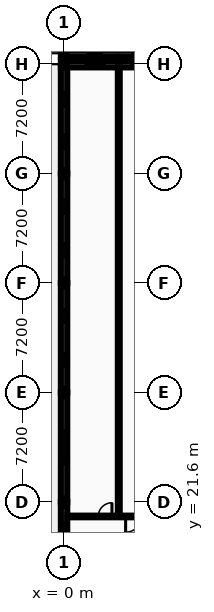
"""IFC4 building model, lengths in metres.
Left out: names, types, materials, properties, quantities, classifications, styles, units other than length and angle.
Written with IfcOpenShell. Run it as: python <this file> out.ifc"""

import sys

from ifc_helpers import new_model, si_unit, direction, frame, frame_2d, origin, origin_2d, place, context, subcontext, project, spatial, rectangle, i_section, extrude, element, fill, save


model = new_model("IFC4")
c1 = context("Model", 3, precision=1e-05, world=origin(), true_north=direction((0.0, 1.0)))
c2 = subcontext(c1, "Body", "Model", "MODEL_VIEW")
j1 = project(units=[si_unit("LENGTHUNIT", "METRE"), si_unit("PLANEANGLEUNIT", "RADIAN")], contexts=[c1])
p1 = place(None, origin())
s1 = spatial("IfcSite", under=j1, at=p1, CompositionType="ELEMENT")
p2 = place(p1, origin())
s2 = spatial("IfcBuilding", under=s1, at=p2, CompositionType="ELEMENT")
p3 = place(p2, origin())
s3 = spatial("IfcBuildingStorey", under=s2, at=p3, CompositionType="ELEMENT", Elevation=0.0)
for number, where, z_axis, x_axis in (
    (1, (0.0, 21.6, 0.0), (0.0, 0.0, 1.0), (1.0, 0.0, 0.0)),
    (2, (0.0, 28.8, 0.0), (0.0, 0.0, 1.0), (1.0, 0.0, 0.0)),
    (3, (0.0, 36.0, 0.0), (0.0, 0.0, 1.0), (1.0, 0.0, 0.0)),
    (4, (0.0, 43.2, 0.0), (0.0, 0.0, 1.0), (1.0, 0.0, 0.0)),
):
    element("IfcColumn", number, at=place(p3, frame(where, z_axis=z_axis, x_axis=x_axis)), inside=s3, PredefinedType="COLUMN", context=c2, shape_type="SweptSolid", body=[
        extrude(i_section(OverallWidth=0.3, OverallDepth=0.5, WebThickness=0.014, FlangeThickness=0.028, FilletRadius=0.027, at=origin_2d()), origin(), (0.0, 0.0, 1.0), 5.2),
    ])
p4 = place(p3, frame((0.0, 50.4, 0.0), z_axis=(0.0, 0.0, 1.0), x_axis=(1.0, 0.0, 0.0)))
e5 = element("IfcColumn", 5, at=p4, inside=s3, PredefinedType="COLUMN", context=c2, shape_type="SweptSolid", body=[
    extrude(i_section(OverallWidth=0.3, OverallDepth=0.45, WebThickness=0.014, FlangeThickness=0.026, FilletRadius=0.027, at=origin_2d()), origin(), (0.0, 0.0, 1.0), 5.2),
])
p5 = place(p3, frame((0.0, 51.12, 0.0), z_axis=(0.0, 0.0, 1.0), x_axis=(1.0, 0.0, 0.0)))
e6 = element("IfcColumn", 6, at=p5, inside=s3, PredefinedType="COLUMN", context=c2, shape_type="SweptSolid", body=[
    extrude(i_section(OverallWidth=0.3, OverallDepth=0.36, WebThickness=0.012, FlangeThickness=0.022, FilletRadius=0.027, at=origin_2d()), origin(), (0.0, 0.0, 1.0), 5.2),
])
p6 = place(p3, frame((7.31, 50.4, 0.0), z_axis=(0.0, 0.0, 1.0), x_axis=(-1.0, 0.0, 0.0)))
e7 = element("IfcWall", 7, at=p6, inside=s3, PredefinedType="STANDARD", context=c2, shape_type="SweptSolid", body=[
    extrude(rectangle(XDim=7.52, YDim=0.42, at=frame_2d((3.76, 0.0))), origin(), (0.0, 0.0, 1.0), 4.665),
])
p7 = place(p6, frame((1.656, 0.0, 0.9)))
e8 = element("IfcOpeningElement", 8, at=p7, cuts=e7, PredefinedType="OPENING", context=c2, shape_type="SweptSolid", body=[
    extrude(rectangle(XDim=1.2, YDim=1.8, at=frame_2d((0.6, 0.9))), frame((0.0, 0.22, 0.0), z_axis=(0.0, -1.0, 0.0), x_axis=(1.0, 0.0, 0.0)), (0.0, 0.0, 1.0), 0.44),
])
p8 = place(p6, frame((4.664, 0.0, 0.9)))
e9 = element("IfcOpeningElement", 9, at=p8, cuts=e7, PredefinedType="OPENING", context=c2, shape_type="SweptSolid", body=[
    extrude(rectangle(XDim=1.2, YDim=1.8, at=frame_2d((0.6, 0.9))), frame((0.0, 0.22, 0.0), z_axis=(0.0, -1.0, 0.0), x_axis=(1.0, 0.0, 0.0)), (0.0, 0.0, 1.0), 0.44),
])
p9 = place(p3, frame((0.0, 21.6, 0.0), z_axis=(0.0, 0.0, 1.0), x_axis=(0.0, -1.0, 0.0)))
e10 = element("IfcWall", 10, at=p9, inside=s3, PredefinedType="STANDARD", context=c2, shape_type="SweptSolid", body=[
    extrude(rectangle(XDim=7.15, YDim=0.42, at=frame_2d((3.575, 0.0))), origin(), (0.0, 0.0, 1.0), 4.97),
])
p10 = place(p9, frame((1.345, 0.0, 1.2)))
e11 = element("IfcOpeningElement", 11, at=p10, cuts=e10, PredefinedType="OPENING", context=c2, shape_type="SweptSolid", body=[
    extrude(rectangle(XDim=1.6, YDim=1.4, at=frame_2d((0.8, 0.7))), frame((0.0, 0.22, 0.0), z_axis=(0.0, -1.0, 0.0), x_axis=(1.0, 0.0, 0.0)), (0.0, 0.0, 1.0), 0.44),
])
p11 = place(p9, frame((4.205, 0.0, 1.2)))
e12 = element("IfcOpeningElement", 12, at=p11, cuts=e10, PredefinedType="OPENING", context=c2, shape_type="SweptSolid", body=[
    extrude(rectangle(XDim=1.6, YDim=1.4, at=frame_2d((0.8, 0.7))), frame((0.0, 0.22, 0.0), z_axis=(0.0, -1.0, 0.0), x_axis=(1.0, 0.0, 0.0)), (0.0, 0.0, 1.0), 0.44),
])
p12 = place(p3, frame((0.0, 28.8, 0.0), z_axis=(0.0, 0.0, 1.0), x_axis=(0.0, -1.0, 0.0)))
e13 = element("IfcWall", 13, at=p12, inside=s3, PredefinedType="STANDARD", context=c2, shape_type="SweptSolid", body=[
    extrude(rectangle(XDim=7.2, YDim=0.42, at=frame_2d((3.6, 0.0))), origin(), (0.0, 0.0, 1.0), 4.595),
])
p13 = place(p12, frame((2.5, 0.0, 0.95)))
e14 = element("IfcOpeningElement", 14, at=p13, cuts=e13, PredefinedType="OPENING", context=c2, shape_type="SweptSolid", body=[
    extrude(rectangle(XDim=2.2, YDim=1.75, at=frame_2d((1.1, 0.875))), frame((0.0, 0.22, 0.0), z_axis=(0.0, -1.0, 0.0), x_axis=(1.0, 0.0, 0.0)), (0.0, 0.0, 1.0), 0.44),
])
p14 = place(p3, frame((0.0, 36.0, 0.0), z_axis=(0.0, 0.0, 1.0), x_axis=(0.0, -1.0, 0.0)))
e15 = element("IfcWall", 15, at=p14, inside=s3, PredefinedType="STANDARD", context=c2, shape_type="SweptSolid", body=[
    extrude(rectangle(XDim=7.2, YDim=0.42, at=frame_2d((3.6, 0.0))), origin(), (0.0, 0.0, 1.0), 4.595),
])
p15 = place(p14, frame((1.73, 0.0, 0.95)))
e16 = element("IfcOpeningElement", 16, at=p15, cuts=e15, PredefinedType="OPENING", context=c2, shape_type="SweptSolid", body=[
    extrude(rectangle(XDim=0.86, YDim=1.26, at=frame_2d((0.43, 0.63))), frame((0.0, 0.22, 0.0), z_axis=(0.0, -1.0, 0.0), x_axis=(1.0, 0.0, 0.0)), (0.0, 0.0, 1.0), 0.44),
])
p16 = place(p14, frame((4.61, 0.0, 0.95)))
e17 = element("IfcOpeningElement", 17, at=p16, cuts=e15, PredefinedType="OPENING", context=c2, shape_type="SweptSolid", body=[
    extrude(rectangle(XDim=0.86, YDim=1.26, at=frame_2d((0.43, 0.63))), frame((0.0, 0.22, 0.0), z_axis=(0.0, -1.0, 0.0), x_axis=(1.0, 0.0, 0.0)), (0.0, 0.0, 1.0), 0.44),
])
p17 = place(p3, frame((0.0, 43.2, 0.0), z_axis=(0.0, 0.0, 1.0), x_axis=(0.0, -1.0, 0.0)))
e18 = element("IfcWall", 18, at=p17, inside=s3, PredefinedType="STANDARD", context=c2, shape_type="SweptSolid", body=[
    extrude(rectangle(XDim=7.2, YDim=0.42, at=frame_2d((3.6, 0.0))), origin(), (0.0, 0.0, 1.0), 4.595),
])
p18 = place(p17, frame((1.713, 0.0, 0.95)))
e19 = element("IfcOpeningElement", 19, at=p18, cuts=e18, PredefinedType="OPENING", context=c2, shape_type="SweptSolid", body=[
    extrude(rectangle(XDim=0.894, YDim=1.26, at=frame_2d((0.447, 0.63))), frame((0.0, 0.22, 0.0), z_axis=(0.0, -1.0, 0.0), x_axis=(1.0, 0.0, 0.0)), (0.0, 0.0, 1.0), 0.44),
])
p19 = place(p17, frame((4.593, 0.0, 0.95)))
e20 = element("IfcOpeningElement", 20, at=p19, cuts=e18, PredefinedType="OPENING", context=c2, shape_type="SweptSolid", body=[
    extrude(rectangle(XDim=0.894, YDim=1.26, at=frame_2d((0.447, 0.63))), frame((0.0, 0.22, 0.0), z_axis=(0.0, -1.0, 0.0), x_axis=(1.0, 0.0, 0.0)), (0.0, 0.0, 1.0), 0.44),
])
p20 = place(p3, frame((0.0, 50.19, 0.0), z_axis=(0.0, 0.0, 1.0), x_axis=(0.0, -1.0, 0.0)))
e21 = element("IfcWall", 21, at=p20, inside=s3, PredefinedType="STANDARD", context=c2, shape_type="SweptSolid", body=[
    extrude(rectangle(XDim=6.99, YDim=0.42, at=frame_2d((3.495, 0.0))), origin(), (0.0, 0.0, 1.0), 4.595),
])
p21 = place(p20, frame((1.633, 0.0, 0.95)))
e22 = element("IfcOpeningElement", 22, at=p21, cuts=e21, PredefinedType="OPENING", context=c2, shape_type="SweptSolid", body=[
    extrude(rectangle(XDim=0.928, YDim=1.26, at=frame_2d((0.464, 0.63))), frame((0.0, 0.22, 0.0), z_axis=(0.0, -1.0, 0.0), x_axis=(1.0, 0.0, 0.0)), (0.0, 0.0, 1.0), 0.44),
])
p22 = place(p20, frame((4.429, 0.0, 0.95)))
e23 = element("IfcOpeningElement", 23, at=p22, cuts=e21, PredefinedType="OPENING", context=c2, shape_type="SweptSolid", body=[
    extrude(rectangle(XDim=0.928, YDim=1.26, at=frame_2d((0.464, 0.63))), frame((0.0, 0.22, 0.0), z_axis=(0.0, -1.0, 0.0), x_axis=(1.0, 0.0, 0.0)), (0.0, 0.0, 1.0), 0.44),
])
p23 = place(p3, frame((-0.21, 51.12, 0.0), z_axis=(0.0, 0.0, 1.0), x_axis=(1.0, 0.0, 0.0)))
e24 = element("IfcWall", 24, at=p23, inside=s3, PredefinedType="STANDARD", context=c2, shape_type="SweptSolid", body=[
    extrude(rectangle(XDim=7.41, YDim=0.42, at=frame_2d((3.705, 0.0))), origin(), (0.0, 0.0, 1.0), 4.635),
])
p24 = place(p23, frame((1.776, 0.0, 0.95)))
e25 = element("IfcOpeningElement", 25, at=p24, cuts=e24, PredefinedType="OPENING", context=c2, shape_type="SweptSolid", body=[
    extrude(rectangle(XDim=0.894, YDim=1.404, at=frame_2d((0.447, 0.702))), frame((0.0, 0.22, 0.0), z_axis=(0.0, -1.0, 0.0), x_axis=(1.0, 0.0, 0.0)), (0.0, 0.0, 1.0), 0.44),
])
p25 = place(p23, frame((4.74, 0.0, 0.95)))
e26 = element("IfcOpeningElement", 26, at=p25, cuts=e24, PredefinedType="OPENING", context=c2, shape_type="SweptSolid", body=[
    extrude(rectangle(XDim=0.894, YDim=1.404, at=frame_2d((0.447, 0.702))), frame((0.0, 0.22, 0.0), z_axis=(0.0, -1.0, 0.0), x_axis=(1.0, 0.0, 0.0)), (0.0, 0.0, 1.0), 0.44),
])
p26 = place(p3, frame((0.23, 20.65, 0.0), z_axis=(0.0, 0.0, 1.0), x_axis=(1.0, 0.0, 0.0)))
e27 = element("IfcWall", 27, at=p26, inside=s3, PredefinedType="PARTITIONING", context=c2, shape_type="SweptSolid", body=[
    extrude(rectangle(XDim=13.87, YDim=0.11, at=frame_2d((6.935, 0.0))), origin(), (0.0, 0.0, 1.0), 4.97),
])
p27 = place(p26, frame((2.02, 0.0, 0.0)))
e28 = element("IfcOpeningElement", 28, at=p27, cuts=e27, PredefinedType="OPENING", context=c2, shape_type="SweptSolid", body=[
    extrude(rectangle(XDim=0.9, YDim=2.1, at=frame_2d((0.45, 1.05))), frame((0.0, 0.065, 0.0), z_axis=(0.0, -1.0, 0.0), x_axis=(1.0, 0.0, 0.0)), (0.0, 0.0, 1.0), 0.13),
])
p28 = place(p26, frame((3.82, 0.0, 0.0)))
e29 = element("IfcOpeningElement", 29, at=p28, cuts=e27, PredefinedType="OPENING", context=c2, shape_type="SweptSolid", body=[
    extrude(rectangle(XDim=1.036, YDim=2.068, at=frame_2d((0.518, 1.034))), frame((0.0, 0.065, 0.0), z_axis=(0.0, -1.0, 0.0), x_axis=(1.0, 0.0, 0.0)), (0.0, 0.0, 1.0), 0.13),
])
p29 = place(p26, frame((9.988, 0.0, 0.0)))
e30 = element("IfcOpeningElement", 30, at=p29, cuts=e27, PredefinedType="OPENING", context=c2, shape_type="SweptSolid", body=[
    extrude(rectangle(XDim=1.114, YDim=2.068, at=frame_2d((0.557, 1.034))), frame((0.0, 0.065, 0.0), z_axis=(0.0, -1.0, 0.0), x_axis=(1.0, 0.0, 0.0)), (0.0, 0.0, 1.0), 0.13),
])
p30 = place(p3, frame((3.6, 20.705, 0.0), z_axis=(0.0, 0.0, 1.0), x_axis=(0.0, 1.0, 0.0)))
e31 = element("IfcWall", 31, at=p30, inside=s3, PredefinedType="PARTITIONING", context=c2, shape_type="SweptSolid", body=[
    extrude(rectangle(XDim=29.485, YDim=0.125, at=frame_2d((14.742, 0.0))), origin(), (0.0, 0.0, 1.0), 4.97),
])
p31 = place(p7, origin())
e32 = element("IfcWindow", 32, at=p31, inside=s3, PartitioningType="SINGLE_PANEL", PredefinedType="WINDOW", context=c2, shape_type="SweptSolid", body=[
    extrude(rectangle(XDim=1.2, YDim=1.8, at=frame_2d((0.6, 0.9))), frame((0.0, 0.03, 0.0), z_axis=(0.0, -1.0, 0.0), x_axis=(1.0, 0.0, 0.0)), (0.0, 0.0, 1.0), 0.06),
])
fill(e8, e32)
p32 = place(p8, origin())
e33 = element("IfcWindow", 33, at=p32, inside=s3, PartitioningType="SINGLE_PANEL", PredefinedType="WINDOW", context=c2, shape_type="SweptSolid", body=[
    extrude(rectangle(XDim=1.2, YDim=1.8, at=frame_2d((0.6, 0.9))), frame((0.0, 0.03, 0.0), z_axis=(0.0, -1.0, 0.0), x_axis=(1.0, 0.0, 0.0)), (0.0, 0.0, 1.0), 0.06),
])
fill(e9, e33)
p33 = place(p10, origin())
e34 = element("IfcWindow", 34, at=p33, inside=s3, PartitioningType="SINGLE_PANEL", PredefinedType="WINDOW", context=c2, shape_type="SweptSolid", body=[
    extrude(rectangle(XDim=1.6, YDim=1.4, at=frame_2d((0.8, 0.7))), frame((0.0, 0.03, 0.0), z_axis=(0.0, -1.0, 0.0), x_axis=(1.0, 0.0, 0.0)), (0.0, 0.0, 1.0), 0.06),
])
fill(e11, e34)
p34 = place(p13, origin())
e35 = element("IfcWindow", 35, at=p34, inside=s3, PartitioningType="SINGLE_PANEL", PredefinedType="WINDOW", context=c2, shape_type="SweptSolid", body=[
    extrude(rectangle(XDim=2.2, YDim=1.75, at=frame_2d((1.1, 0.875))), frame((0.0, 0.03, 0.0), z_axis=(0.0, -1.0, 0.0), x_axis=(1.0, 0.0, 0.0)), (0.0, 0.0, 1.0), 0.06),
])
fill(e14, e35)
p35 = place(p15, origin())
e36 = element("IfcWindow", 36, at=p35, inside=s3, PartitioningType="SINGLE_PANEL", PredefinedType="WINDOW", context=c2, shape_type="SweptSolid", body=[
    extrude(rectangle(XDim=0.86, YDim=1.26, at=frame_2d((0.43, 0.63))), frame((0.0, 0.03, 0.0), z_axis=(0.0, -1.0, 0.0), x_axis=(1.0, 0.0, 0.0)), (0.0, 0.0, 1.0), 0.06),
])
fill(e16, e36)
p36 = place(p16, origin())
e37 = element("IfcWindow", 37, at=p36, inside=s3, PartitioningType="SINGLE_PANEL", PredefinedType="WINDOW", context=c2, shape_type="SweptSolid", body=[
    extrude(rectangle(XDim=0.86, YDim=1.26, at=frame_2d((0.43, 0.63))), frame((0.0, 0.03, 0.0), z_axis=(0.0, -1.0, 0.0), x_axis=(1.0, 0.0, 0.0)), (0.0, 0.0, 1.0), 0.06),
])
fill(e17, e37)
p37 = place(p18, origin())
e38 = element("IfcWindow", 38, at=p37, inside=s3, PartitioningType="SINGLE_PANEL", PredefinedType="WINDOW", context=c2, shape_type="SweptSolid", body=[
    extrude(rectangle(XDim=0.894, YDim=1.26, at=frame_2d((0.447, 0.63))), frame((0.0, 0.03, 0.0), z_axis=(0.0, -1.0, 0.0), x_axis=(1.0, 0.0, 0.0)), (0.0, 0.0, 1.0), 0.06),
])
fill(e19, e38)
p38 = place(p19, origin())
e39 = element("IfcWindow", 39, at=p38, inside=s3, PartitioningType="SINGLE_PANEL", PredefinedType="WINDOW", context=c2, shape_type="SweptSolid", body=[
    extrude(rectangle(XDim=0.894, YDim=1.26, at=frame_2d((0.447, 0.63))), frame((0.0, 0.03, 0.0), z_axis=(0.0, -1.0, 0.0), x_axis=(1.0, 0.0, 0.0)), (0.0, 0.0, 1.0), 0.06),
])
fill(e20, e39)
p39 = place(p21, origin())
e40 = element("IfcWindow", 40, at=p39, inside=s3, PartitioningType="SINGLE_PANEL", PredefinedType="WINDOW", context=c2, shape_type="SweptSolid", body=[
    extrude(rectangle(XDim=0.928, YDim=1.26, at=frame_2d((0.464, 0.63))), frame((0.0, 0.03, 0.0), z_axis=(0.0, -1.0, 0.0), x_axis=(1.0, 0.0, 0.0)), (0.0, 0.0, 1.0), 0.06),
])
fill(e22, e40)
p40 = place(p22, origin())
e41 = element("IfcWindow", 41, at=p40, inside=s3, PartitioningType="SINGLE_PANEL", PredefinedType="WINDOW", context=c2, shape_type="SweptSolid", body=[
    extrude(rectangle(XDim=0.928, YDim=1.26, at=frame_2d((0.464, 0.63))), frame((0.0, 0.03, 0.0), z_axis=(0.0, -1.0, 0.0), x_axis=(1.0, 0.0, 0.0)), (0.0, 0.0, 1.0), 0.06),
])
fill(e23, e41)
p41 = place(p24, origin())
e42 = element("IfcWindow", 42, at=p41, inside=s3, PartitioningType="SINGLE_PANEL", PredefinedType="WINDOW", context=c2, shape_type="SweptSolid", body=[
    extrude(rectangle(XDim=0.894, YDim=1.404, at=frame_2d((0.447, 0.702))), frame((0.0, 0.03, 0.0), z_axis=(0.0, -1.0, 0.0), x_axis=(1.0, 0.0, 0.0)), (0.0, 0.0, 1.0), 0.06),
])
fill(e25, e42)
p42 = place(p25, origin())
e43 = element("IfcWindow", 43, at=p42, inside=s3, PartitioningType="SINGLE_PANEL", PredefinedType="WINDOW", context=c2, shape_type="SweptSolid", body=[
    extrude(rectangle(XDim=0.894, YDim=1.404, at=frame_2d((0.447, 0.702))), frame((0.0, 0.03, 0.0), z_axis=(0.0, -1.0, 0.0), x_axis=(1.0, 0.0, 0.0)), (0.0, 0.0, 1.0), 0.06),
])
fill(e26, e43)
p43 = place(p27, frame((0.9, 0.0, 0.0), z_axis=(0.0, 0.0, 1.0), x_axis=(-1.0, 0.0, 0.0)))
e44 = element("IfcDoor", 44, at=p43, inside=s3, OperationType="SINGLE_SWING_RIGHT", PredefinedType="DOOR", context=c2, shape_type="SweptSolid", body=[
    extrude(rectangle(XDim=0.9, YDim=2.1, at=frame_2d((0.45, 1.05))), frame((0.0, 0.025, 0.0), z_axis=(0.0, -1.0, 0.0), x_axis=(1.0, 0.0, 0.0)), (0.0, 0.0, 1.0), 0.05),
])
fill(e28, e44)
p44 = place(p28, frame((1.036, 0.0, 0.0), z_axis=(0.0, 0.0, 1.0), x_axis=(-1.0, 0.0, 0.0)))
e45 = element("IfcDoor", 45, at=p44, inside=s3, OperationType="SINGLE_SWING_LEFT", PredefinedType="DOOR", context=c2, shape_type="SweptSolid", body=[
    extrude(rectangle(XDim=1.036, YDim=2.068, at=frame_2d((0.518, 1.034))), frame((0.0, 0.025, 0.0), z_axis=(0.0, -1.0, 0.0), x_axis=(1.0, 0.0, 0.0)), (0.0, 0.0, 1.0), 0.05),
])
fill(e29, e45)
save(model, sys.argv[1])
